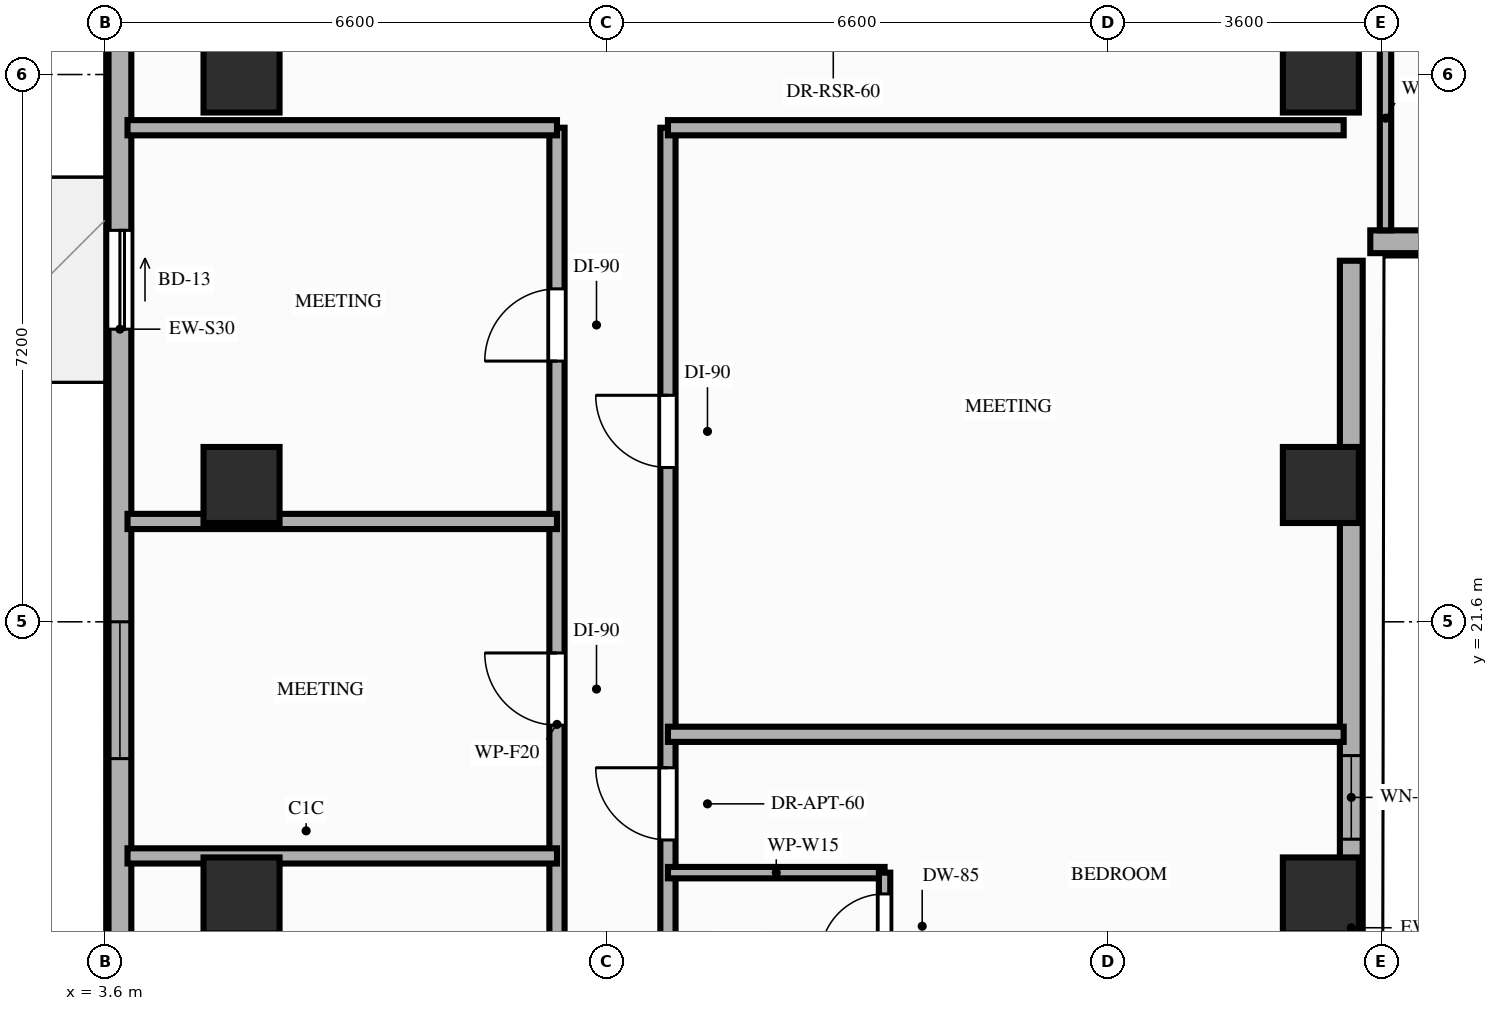
"""IFC4 building model, lengths in metres.
Left out: names, types, materials, properties, quantities, classifications, styles, units other than length and angle.
Written with IfcOpenShell. Run it as: python <this file> out.ifc"""

import sys

from ifc_helpers import new_model, si_unit, direction, frame, frame_2d, origin, origin_2d, place, context, subcontext, project, spatial, rectangle, extrude, element, fill, save


model = new_model("IFC4")
c1 = context("Model", 3, precision=1e-05, world=origin(), true_north=direction((0.0, 1.0)))
c2 = subcontext(c1, "Body", "Model", "MODEL_VIEW")
j1 = project(units=[si_unit("LENGTHUNIT", "METRE"), si_unit("PLANEANGLEUNIT", "RADIAN")], contexts=[c1])
p1 = place(None, origin())
s1 = spatial("IfcSite", under=j1, at=p1, CompositionType="ELEMENT")
p2 = place(p1, origin())
s2 = spatial("IfcBuilding", under=s1, at=p2, CompositionType="ELEMENT")
p3 = place(p2, frame((0.0, 0.0, 129.8)))
s3 = spatial("IfcBuildingStorey", under=s2, at=p3, CompositionType="ELEMENT", Elevation=129.8)
for number, where, z_axis, x_axis in (
    (1, (5.4, 18.0, 0.0), (0.0, 0.0, 1.0), (1.0, 0.0, 0.0)),
    (2, (19.6, 18.0, 0.0), (0.0, 0.0, 1.0), (1.0, 0.0, 0.0)),
    (3, (5.4, 23.4, 0.0), (0.0, 0.0, 1.0), (1.0, 0.0, 0.0)),
    (4, (19.6, 23.4, 0.0), (0.0, 0.0, 1.0), (1.0, 0.0, 0.0)),
    (5, (5.4, 28.8, 0.0), (0.0, 0.0, 1.0), (1.0, 0.0, 0.0)),
    (6, (19.6, 28.8, 0.0), (0.0, 0.0, 1.0), (1.0, 0.0, 0.0)),
):
    element("IfcColumn", number, at=place(p3, frame(where, z_axis=z_axis, x_axis=x_axis)), inside=s3, PredefinedType="COLUMN", context=c2, shape_type="SweptSolid", body=[
        extrude(rectangle(XDim=1.0, YDim=1.0, at=origin_2d()), origin(), (0.0, 0.0, 1.0), 3.2),
    ])
p4 = place(p3, frame((3.8, 42.1, 0.0), z_axis=(0.0, 0.0, 1.0), x_axis=(0.0, -1.0, 0.0)))
e7 = element("IfcWall", 7, at=p4, inside=s3, PredefinedType="STANDARD", context=c2, shape_type="SweptSolid", body=[
    extrude(rectangle(XDim=33.3, YDim=0.3, at=frame_2d((16.65, 0.0))), origin(), (0.0, 0.0, 1.0), 2.71),
])
p5 = place(p4, frame((26.15, 0.0, 0.0)))
e8 = element("IfcOpeningElement", 8, at=p5, cuts=e7, PredefinedType="OPENING", context=c2, shape_type="SweptSolid", body=[
    extrude(rectangle(XDim=1.3, YDim=2.08, at=frame_2d((0.65, 1.04))), frame((0.0, 0.16, 0.0), z_axis=(0.0, -1.0, 0.0), x_axis=(1.0, 0.0, 0.0)), (0.0, 0.0, 1.0), 0.32),
])
p6 = place(p4, frame((15.35, 0.0, 0.0)))
e9 = element("IfcOpeningElement", 9, at=p6, cuts=e7, PredefinedType="OPENING", context=c2, shape_type="SweptSolid", body=[
    extrude(rectangle(XDim=1.3, YDim=2.08, at=frame_2d((0.65, 1.04))), frame((0.0, 0.16, 0.0), z_axis=(0.0, -1.0, 0.0), x_axis=(1.0, 0.0, 0.0)), (0.0, 0.0, 1.0), 0.32),
])
p7 = place(p4, frame((30.8, 0.0, 0.85)))
e10 = element("IfcOpeningElement", 10, at=p7, cuts=e7, PredefinedType="OPENING", context=c2, shape_type="SweptSolid", body=[
    extrude(rectangle(XDim=1.8, YDim=1.61, at=frame_2d((0.9, 0.805))), frame((0.0, 0.16, 0.0), z_axis=(0.0, -1.0, 0.0), x_axis=(1.0, 0.0, 0.0)), (0.0, 0.0, 1.0), 0.32),
])
p8 = place(p4, frame((20.5, 0.0, 0.85)))
e11 = element("IfcOpeningElement", 11, at=p8, cuts=e7, PredefinedType="OPENING", context=c2, shape_type="SweptSolid", body=[
    extrude(rectangle(XDim=1.8, YDim=1.61, at=frame_2d((0.9, 0.805))), frame((0.0, 0.16, 0.0), z_axis=(0.0, -1.0, 0.0), x_axis=(1.0, 0.0, 0.0)), (0.0, 0.0, 1.0), 0.32),
])
p9 = place(p4, frame((9.9, 0.0, 0.85)))
e12 = element("IfcOpeningElement", 12, at=p9, cuts=e7, PredefinedType="OPENING", context=c2, shape_type="SweptSolid", body=[
    extrude(rectangle(XDim=1.8, YDim=1.61, at=frame_2d((0.9, 0.805))), frame((0.0, 0.16, 0.0), z_axis=(0.0, -1.0, 0.0), x_axis=(1.0, 0.0, 0.0)), (0.0, 0.0, 1.0), 0.32),
])
p10 = place(p4, frame((3.8, 0.0, 0.85)))
e13 = element("IfcOpeningElement", 13, at=p10, cuts=e7, PredefinedType="OPENING", context=c2, shape_type="SweptSolid", body=[
    extrude(rectangle(XDim=1.8, YDim=1.61, at=frame_2d((0.9, 0.805))), frame((0.0, 0.16, 0.0), z_axis=(0.0, -1.0, 0.0), x_axis=(1.0, 0.0, 0.0)), (0.0, 0.0, 1.0), 0.32),
])
p11 = place(p3, frame((20.0, 8.8, 0.0), z_axis=(0.0, 0.0, 1.0), x_axis=(0.0, 1.0, 0.0)))
e14 = element("IfcWall", 14, at=p11, inside=s3, PredefinedType="STANDARD", context=c2, shape_type="SweptSolid", body=[
    extrude(rectangle(XDim=17.55, YDim=0.3, at=frame_2d((8.775, 0.0))), origin(), (0.0, 0.0, 1.0), 2.45),
])
p12 = place(p11, frame((9.94, 0.0, 0.85)))
e15 = element("IfcOpeningElement", 15, at=p12, cuts=e14, PredefinedType="OPENING", context=c2, shape_type="SweptSolid", body=[
    extrude(rectangle(XDim=1.1, YDim=1.35, at=frame_2d((0.55, 0.675))), frame((0.0, 0.16, 0.0), z_axis=(0.0, -1.0, 0.0), x_axis=(1.0, 0.0, 0.0)), (0.0, 0.0, 1.0), 0.32),
])
p13 = place(p3, frame((20.25, 26.6, 0.0), z_axis=(0.0, 0.0, 1.0), x_axis=(1.0, 0.0, 0.0)))
e16 = element("IfcWall", 16, at=p13, inside=s3, PredefinedType="STANDARD", context=c2, shape_type="SweptSolid", body=[
    extrude(rectangle(XDim=26.15, YDim=0.3, at=frame_2d((13.075, 0.0))), origin(), (0.0, 0.0, 1.0), 2.71),
])
p14 = place(p13, frame((13.9, 0.0, 0.0)))
e17 = element("IfcOpeningElement", 17, at=p14, cuts=e16, PredefinedType="OPENING", context=c2, shape_type="SweptSolid", body=[
    extrude(rectangle(XDim=1.3, YDim=2.08, at=frame_2d((0.65, 1.04))), frame((0.0, 0.16, 0.0), z_axis=(0.0, -1.0, 0.0), x_axis=(1.0, 0.0, 0.0)), (0.0, 0.0, 1.0), 0.32),
])
p15 = place(p13, frame((2.25, 0.0, 0.85)))
e18 = element("IfcOpeningElement", 18, at=p15, cuts=e16, PredefinedType="OPENING", context=c2, shape_type="SweptSolid", body=[
    extrude(rectangle(XDim=1.8, YDim=1.61, at=frame_2d((0.9, 0.805))), frame((0.0, 0.16, 0.0), z_axis=(0.0, -1.0, 0.0), x_axis=(1.0, 0.0, 0.0)), (0.0, 0.0, 1.0), 0.32),
])
p16 = place(p13, frame((7.75, 0.0, 0.85)))
e19 = element("IfcOpeningElement", 19, at=p16, cuts=e16, PredefinedType="OPENING", context=c2, shape_type="SweptSolid", body=[
    extrude(rectangle(XDim=1.8, YDim=1.61, at=frame_2d((0.9, 0.805))), frame((0.0, 0.16, 0.0), z_axis=(0.0, -1.0, 0.0), x_axis=(1.0, 0.0, 0.0)), (0.0, 0.0, 1.0), 0.32),
])
p17 = place(p13, frame((22.25, 0.0, 0.85)))
e20 = element("IfcOpeningElement", 20, at=p17, cuts=e16, PredefinedType="OPENING", context=c2, shape_type="SweptSolid", body=[
    extrude(rectangle(XDim=1.8, YDim=1.61, at=frame_2d((0.9, 0.805))), frame((0.0, 0.16, 0.0), z_axis=(0.0, -1.0, 0.0), x_axis=(1.0, 0.0, 0.0)), (0.0, 0.0, 1.0), 0.32),
])
p18 = place(p3, frame((9.55, 12.4, 0.0), z_axis=(0.0, 0.0, 1.0), x_axis=(0.0, 1.0, 0.0)))
e21 = element("IfcWall", 21, at=p18, inside=s3, PredefinedType="PARTITIONING", context=c2, shape_type="SweptSolid", body=[
    extrude(rectangle(XDim=15.7, YDim=0.2, at=frame_2d((7.85, 0.0))), origin(), (0.0, 0.0, 1.0), 2.45),
])
p19 = place(p18, frame((2.58, 0.0, 0.0)))
e22 = element("IfcOpeningElement", 22, at=p19, cuts=e21, PredefinedType="OPENING", context=c2, shape_type="SweptSolid", body=[
    extrude(rectangle(XDim=0.95, YDim=2.15, at=frame_2d((0.475, 1.075))), frame((0.0, 0.11, 0.0), z_axis=(0.0, -1.0, 0.0), x_axis=(1.0, 0.0, 0.0)), (0.0, 0.0, 1.0), 0.22),
])
p20 = place(p18, frame((7.84, 0.0, 0.0)))
e23 = element("IfcOpeningElement", 23, at=p20, cuts=e21, PredefinedType="OPENING", context=c2, shape_type="SweptSolid", body=[
    extrude(rectangle(XDim=0.95, YDim=2.15, at=frame_2d((0.475, 1.075))), frame((0.0, 0.11, 0.0), z_axis=(0.0, -1.0, 0.0), x_axis=(1.0, 0.0, 0.0)), (0.0, 0.0, 1.0), 0.22),
])
p21 = place(p18, frame((12.63, 0.0, 0.0)))
e24 = element("IfcOpeningElement", 24, at=p21, cuts=e21, PredefinedType="OPENING", context=c2, shape_type="SweptSolid", body=[
    extrude(rectangle(XDim=0.95, YDim=2.15, at=frame_2d((0.475, 1.075))), frame((0.0, 0.11, 0.0), z_axis=(0.0, -1.0, 0.0), x_axis=(1.0, 0.0, 0.0)), (0.0, 0.0, 1.0), 0.22),
])
p22 = place(p3, frame((11.01, 12.4, 0.0), z_axis=(0.0, 0.0, 1.0), x_axis=(0.0, 1.0, 0.0)))
e25 = element("IfcWall", 25, at=p22, inside=s3, PredefinedType="PARTITIONING", context=c2, shape_type="SweptSolid", body=[
    extrude(rectangle(XDim=15.7, YDim=0.2, at=frame_2d((7.85, 0.0))), origin(), (0.0, 0.0, 1.0), 2.45),
])
p23 = place(p22, frame((0.45, 0.0, 0.0)))
e26 = element("IfcOpeningElement", 26, at=p23, cuts=e25, PredefinedType="OPENING", context=c2, shape_type="SweptSolid", body=[
    extrude(rectangle(XDim=0.95, YDim=2.15, at=frame_2d((0.475, 1.075))), frame((0.0, 0.11, 0.0), z_axis=(0.0, -1.0, 0.0), x_axis=(1.0, 0.0, 0.0)), (0.0, 0.0, 1.0), 0.22),
])
p24 = place(p22, frame((2.67, 0.0, 0.0)))
e27 = element("IfcOpeningElement", 27, at=p24, cuts=e25, PredefinedType="OPENING", context=c2, shape_type="SweptSolid", body=[
    extrude(rectangle(XDim=0.95, YDim=2.1, at=frame_2d((0.475, 1.05))), frame((0.0, 0.11, 0.0), z_axis=(0.0, -1.0, 0.0), x_axis=(1.0, 0.0, 0.0)), (0.0, 0.0, 1.0), 0.22),
])
p25 = place(p22, frame((11.23, 0.0, 0.0)))
e28 = element("IfcOpeningElement", 28, at=p25, cuts=e25, PredefinedType="OPENING", context=c2, shape_type="SweptSolid", body=[
    extrude(rectangle(XDim=0.95, YDim=2.15, at=frame_2d((0.475, 1.075))), frame((0.0, 0.11, 0.0), z_axis=(0.0, -1.0, 0.0), x_axis=(1.0, 0.0, 0.0)), (0.0, 0.0, 1.0), 0.22),
])
p26 = place(p22, frame((6.33, 0.0, 0.0)))
e29 = element("IfcOpeningElement", 29, at=p26, cuts=e25, PredefinedType="OPENING", context=c2, shape_type="SweptSolid", body=[
    extrude(rectangle(XDim=0.95, YDim=2.15, at=frame_2d((0.475, 1.075))), frame((0.0, 0.11, 0.0), z_axis=(0.0, -1.0, 0.0), x_axis=(1.0, 0.0, 0.0)), (0.0, 0.0, 1.0), 0.22),
])
p27 = place(p3, frame((3.9, 28.1, 0.0), z_axis=(0.0, 0.0, 1.0), x_axis=(1.0, 0.0, 0.0)))
e30 = element("IfcWall", 30, at=p27, inside=s3, PredefinedType="PARTITIONING", context=c2, shape_type="SweptSolid", body=[
    extrude(rectangle(XDim=5.65, YDim=0.2, at=frame_2d((2.825, 0.0))), origin(), (0.0, 0.0, 1.0), 2.45),
])
p28 = place(p3, frame((11.01, 28.1, 0.0), z_axis=(0.0, 0.0, 1.0), x_axis=(1.0, 0.0, 0.0)))
e31 = element("IfcWall", 31, at=p28, inside=s3, PredefinedType="PARTITIONING", context=c2, shape_type="SweptSolid", body=[
    extrude(rectangle(XDim=8.89, YDim=0.2, at=frame_2d((4.445, 0.0))), origin(), (0.0, 0.0, 1.0), 2.45),
])
p29 = place(p3, frame((20.45, 26.75, 0.0), z_axis=(0.0, 0.0, 1.0), x_axis=(0.0, 1.0, 0.0)))
e32 = element("IfcWall", 32, at=p29, inside=s3, PredefinedType="PARTITIONING", context=c2, shape_type="SweptSolid", body=[
    extrude(rectangle(XDim=2.95, YDim=0.15, at=frame_2d((1.475, 0.0))), origin(), (0.0, 0.0, 1.0), 2.45),
])
for number, where, z_axis, x_axis in (
    (33, (3.9, 18.52, 0.0), (0.0, 0.0, 1.0), (1.0, 0.0, 0.0)),
    (34, (3.9, 22.92, 0.0), (0.0, 0.0, 1.0), (1.0, 0.0, 0.0)),
):
    element("IfcWall", number, at=place(p3, frame(where, z_axis=z_axis, x_axis=x_axis)), inside=s3, PredefinedType="PARTITIONING", context=c2, shape_type="SweptSolid", body=[
        extrude(rectangle(XDim=5.65, YDim=0.2, at=frame_2d((2.825, 0.0))), origin(), (0.0, 0.0, 1.0), 2.45),
    ])
p30 = place(p3, frame((11.01, 20.12, 0.0), z_axis=(0.0, 0.0, 1.0), x_axis=(1.0, 0.0, 0.0)))
e35 = element("IfcWall", 35, at=p30, inside=s3, PredefinedType="PARTITIONING", context=c2, shape_type="SweptSolid", body=[
    extrude(rectangle(XDim=8.89, YDim=0.2, at=frame_2d((4.445, 0.0))), origin(), (0.0, 0.0, 1.0), 2.45),
])
p31 = place(p3, frame((11.01, 18.3, 0.0), z_axis=(0.0, 0.0, 1.0), x_axis=(1.0, 0.0, 0.0)))
e36 = element("IfcWall", 36, at=p31, inside=s3, PredefinedType="PARTITIONING", context=c2, shape_type="SweptSolid", body=[
    extrude(rectangle(XDim=2.85, YDim=0.15, at=frame_2d((1.425, 0.0))), origin(), (0.0, 0.0, 1.0), 2.45),
])
p32 = place(p3, frame((13.86, 16.35, 0.0), z_axis=(0.0, 0.0, 1.0), x_axis=(0.0, 1.0, 0.0)))
e37 = element("IfcWall", 37, at=p32, inside=s3, PredefinedType="PARTITIONING", context=c2, shape_type="SweptSolid", body=[
    extrude(rectangle(XDim=1.95, YDim=0.15, at=frame_2d((0.975, 0.0))), origin(), (0.0, 0.0, 1.0), 2.45),
])
p33 = place(p32, frame((0.82, 0.0, 0.0)))
e38 = element("IfcOpeningElement", 38, at=p33, cuts=e37, PredefinedType="OPENING", context=c2, shape_type="SweptSolid", body=[
    extrude(rectangle(XDim=0.85, YDim=2.1, at=frame_2d((0.425, 1.05))), frame((0.0, 0.085, 0.0), z_axis=(0.0, -1.0, 0.0), x_axis=(1.0, 0.0, 0.0)), (0.0, 0.0, 1.0), 0.17),
])
p34 = place(p6, origin())
e39 = element("IfcDoor", 39, at=p34, inside=s3, OperationType="SLIDING_TO_LEFT", PredefinedType="DOOR", context=c2, shape_type="SweptSolid", body=[
    extrude(rectangle(XDim=1.3, YDim=2.08, at=frame_2d((0.65, 1.04))), frame((0.0, 0.025, 0.0), z_axis=(0.0, -1.0, 0.0), x_axis=(1.0, 0.0, 0.0)), (0.0, 0.0, 1.0), 0.05),
])
fill(e9, e39)
p35 = place(p12, origin())
e40 = element("IfcWindow", 40, at=p35, inside=s3, PartitioningType="SINGLE_PANEL", PredefinedType="WINDOW", context=c2, shape_type="SweptSolid", body=[
    extrude(rectangle(XDim=1.1, YDim=1.35, at=frame_2d((0.55, 0.675))), frame((0.0, 0.03, 0.0), z_axis=(0.0, -1.0, 0.0), x_axis=(1.0, 0.0, 0.0)), (0.0, 0.0, 1.0), 0.06),
])
fill(e15, e40)
p36 = place(p8, origin())
e41 = element("IfcWindow", 41, at=p36, inside=s3, PartitioningType="SINGLE_PANEL", PredefinedType="WINDOW", context=c2, shape_type="SweptSolid", body=[
    extrude(rectangle(XDim=1.8, YDim=1.61, at=frame_2d((0.9, 0.805))), frame((0.0, 0.03, 0.0), z_axis=(0.0, -1.0, 0.0), x_axis=(1.0, 0.0, 0.0)), (0.0, 0.0, 1.0), 0.06),
])
fill(e11, e41)
p37 = place(p20, origin())
e42 = element("IfcDoor", 42, at=p37, inside=s3, OperationType="SINGLE_SWING_RIGHT", PredefinedType="DOOR", context=c2, shape_type="SweptSolid", body=[
    extrude(rectangle(XDim=0.95, YDim=2.15, at=frame_2d((0.475, 1.075))), frame((0.0, 0.025, 0.0), z_axis=(0.0, -1.0, 0.0), x_axis=(1.0, 0.0, 0.0)), (0.0, 0.0, 1.0), 0.05),
])
fill(e23, e42)
p38 = place(p21, origin())
e43 = element("IfcDoor", 43, at=p38, inside=s3, OperationType="SINGLE_SWING_LEFT", PredefinedType="DOOR", context=c2, shape_type="SweptSolid", body=[
    extrude(rectangle(XDim=0.95, YDim=2.15, at=frame_2d((0.475, 1.075))), frame((0.0, 0.025, 0.0), z_axis=(0.0, -1.0, 0.0), x_axis=(1.0, 0.0, 0.0)), (0.0, 0.0, 1.0), 0.05),
])
fill(e24, e43)
p39 = place(p25, origin())
e44 = element("IfcDoor", 44, at=p39, inside=s3, OperationType="SINGLE_SWING_RIGHT", PredefinedType="DOOR", context=c2, shape_type="SweptSolid", body=[
    extrude(rectangle(XDim=0.95, YDim=2.15, at=frame_2d((0.475, 1.075))), frame((0.0, 0.025, 0.0), z_axis=(0.0, -1.0, 0.0), x_axis=(1.0, 0.0, 0.0)), (0.0, 0.0, 1.0), 0.05),
])
fill(e28, e44)
p40 = place(p33, origin())
e45 = element("IfcDoor", 45, at=p40, inside=s3, OperationType="SINGLE_SWING_LEFT", PredefinedType="DOOR", context=c2, shape_type="SweptSolid", body=[
    extrude(rectangle(XDim=0.85, YDim=2.1, at=frame_2d((0.425, 1.05))), frame((0.0, 0.025, 0.0), z_axis=(0.0, -1.0, 0.0), x_axis=(1.0, 0.0, 0.0)), (0.0, 0.0, 1.0), 0.05),
])
fill(e38, e45)
p41 = place(p26, origin())
e46 = element("IfcDoor", 46, at=p41, inside=s3, OperationType="SINGLE_SWING_RIGHT", PredefinedType="DOOR", context=c2, shape_type="SweptSolid", body=[
    extrude(rectangle(XDim=0.95, YDim=2.15, at=frame_2d((0.475, 1.075))), frame((0.0, 0.025, 0.0), z_axis=(0.0, -1.0, 0.0), x_axis=(1.0, 0.0, 0.0)), (0.0, 0.0, 1.0), 0.05),
])
fill(e29, e46)
save(model, sys.argv[1])
